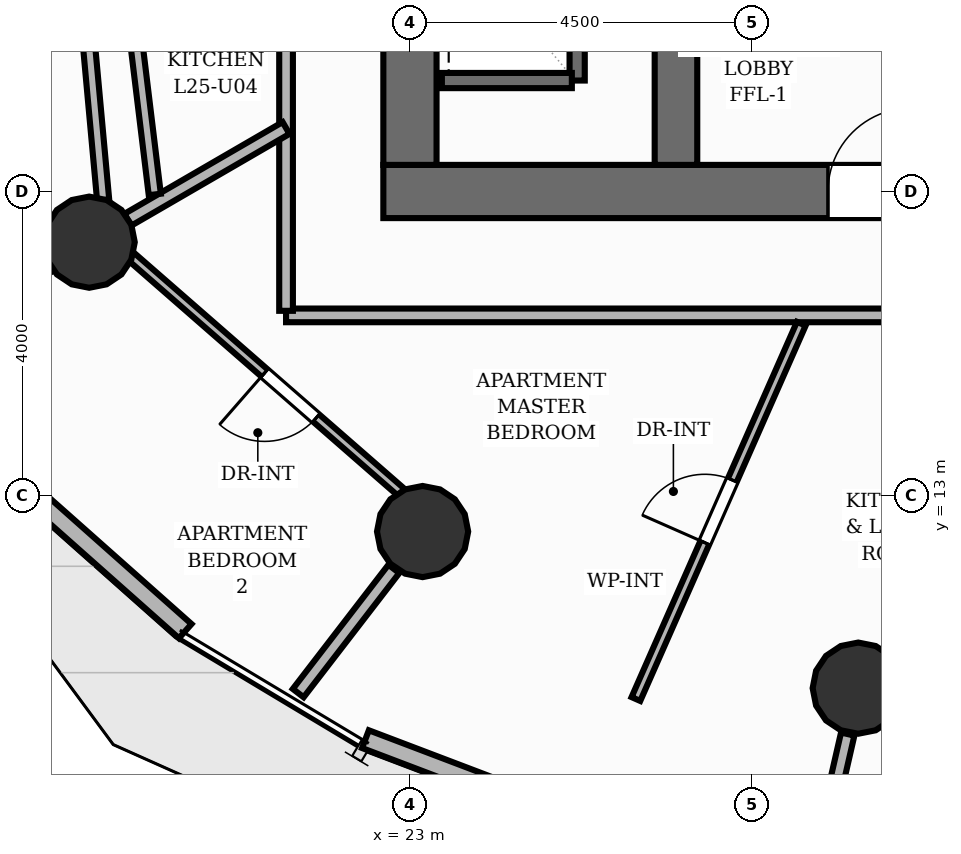
"""IFC4 building model, lengths in metres.
Left out: names, types, materials, properties, quantities, classifications, styles, units other than length and angle.
Written with IfcOpenShell. Run it as: python <this file> out.ifc"""

import sys

from ifc_helpers import new_model, si_unit, direction, frame, frame_2d, origin, origin_2d, place, context, subcontext, project, spatial, rectangle, circle, extrude, element, fill, save


model = new_model("IFC4")
c1 = context("Model", 3, precision=1e-05, world=origin(), true_north=direction((0.0, 1.0)))
c2 = subcontext(c1, "Body", "Model", "MODEL_VIEW")
j1 = project(units=[si_unit("LENGTHUNIT", "METRE"), si_unit("PLANEANGLEUNIT", "RADIAN")], contexts=[c1])
p1 = place(None, origin())
s1 = spatial("IfcSite", under=j1, at=p1, CompositionType="ELEMENT")
p2 = place(p1, origin())
s2 = spatial("IfcBuilding", under=s1, at=p2, CompositionType="ELEMENT")
p3 = place(p2, frame((0.0, 0.0, 86.88)))
s3 = spatial("IfcBuildingStorey", under=s2, at=p3, CompositionType="ELEMENT", Elevation=86.88)
p4 = place(p3, frame((22.65, 17.0, 0.0), z_axis=(0.0, 0.0, 1.0), x_axis=(1.0, 0.0, 0.0)))
e1 = element("IfcWall", 1, at=p4, inside=s3, PredefinedType="SHEAR", context=c2, shape_type="SweptSolid", body=[
    extrude(rectangle(XDim=18.7, YDim=0.7, at=frame_2d((9.35, 0.0))), origin(), (0.0, 0.0, 1.0), 3.2),
])
p5 = place(p4, frame((5.85, 0.0, 0.0)))
e2 = element("IfcOpeningElement", 2, at=p5, cuts=e1, PredefinedType="OPENING", context=c2, shape_type="SweptSolid", body=[
    extrude(rectangle(XDim=1.1, YDim=2.15, at=frame_2d((0.55, 1.075))), frame((0.0, 0.36, 0.0), z_axis=(0.0, -1.0, 0.0), x_axis=(1.0, 0.0, 0.0)), (0.0, 0.0, 1.0), 0.72),
])
p6 = place(p4, frame((9.4, 0.0, 0.0)))
e3 = element("IfcOpeningElement", 3, at=p6, cuts=e1, PredefinedType="OPENING", context=c2, shape_type="SweptSolid", body=[
    extrude(rectangle(XDim=0.9, YDim=2.1, at=frame_2d((0.45, 1.05))), frame((0.0, 0.36, 0.0), z_axis=(0.0, -1.0, 0.0), x_axis=(1.0, 0.0, 0.0)), (0.0, 0.0, 1.0), 0.72),
])
p7 = place(p3, frame((23.0, 17.35, 0.0), z_axis=(0.0, 0.0, 1.0), x_axis=(0.0, 1.0, 0.0)))
e4 = element("IfcWall", 4, at=p7, inside=s3, PredefinedType="SHEAR", context=c2, shape_type="SweptSolid", body=[
    extrude(rectangle(XDim=13.3, YDim=0.7, at=frame_2d((6.65, 0.0))), origin(), (0.0, 0.0, 1.0), 3.2),
])
p8 = place(p3, frame((26.5, 17.35, 0.0), z_axis=(0.0, 0.0, 1.0), x_axis=(0.0, 1.0, 0.0)))
e5 = element("IfcWall", 5, at=p8, inside=s3, PredefinedType="SHEAR", context=c2, shape_type="SweptSolid", body=[
    extrude(rectangle(XDim=13.3, YDim=0.56, at=frame_2d((6.65, 0.0))), origin(), (0.0, 0.0, 1.0), 3.2),
])
for number, where, z_axis, x_axis in (
    (6, (18.78, 16.333, 0.0), (0.0, 0.0, 1.0), (1.0, 0.0, 0.0)),
    (7, (23.167, 12.526, 0.0), (0.0, 0.0, 1.0), (1.0, 0.0, 0.0)),
    (8, (28.898, 10.465, 0.0), (0.0, 0.0, 1.0), (1.0, 0.0, 0.0)),
):
    element("IfcColumn", number, at=place(p3, frame(where, z_axis=z_axis, x_axis=x_axis)), inside=s3, PredefinedType="COLUMN", context=c2, shape_type="SweptSolid", body=[
        extrude(circle(Radius=0.6, at=origin_2d()), origin(), (0.0, 0.0, 1.0), 3.2),
    ])
p9 = place(p3, frame((20.043, 11.216, 0.0), z_axis=(0.0, 0.0, 1.0), x_axis=(-0.747828492436, 0.663891968547, 0.0)))
e9 = element("IfcWall", 9, at=p9, inside=s3, PredefinedType="SOLIDWALL", context=c2, shape_type="SweptSolid", body=[
    extrude(rectangle(XDim=2.923, YDim=0.25, at=frame_2d((1.461, 0.0))), origin(), (0.0, 0.0, 1.0), 2.96),
])
p10 = place(p3, frame((25.276, 8.707, 0.0), z_axis=(0.0, 0.0, 1.0), x_axis=(-0.934815891493, 0.355132720277, 0.0)))
e10 = element("IfcWall", 10, at=p10, inside=s3, PredefinedType="SOLIDWALL", context=c2, shape_type="SweptSolid", body=[
    extrude(rectangle(XDim=3.061, YDim=0.25, at=frame_2d((1.53, 0.0))), origin(), (0.0, 0.0, 1.0), 2.96),
])
p11 = place(p3, frame((25.2, 18.46, 0.0), z_axis=(0.0, 0.0, 1.0), x_axis=(0.0, 1.0, 0.0)))
e11 = element("IfcWall", 11, at=p11, inside=s3, PredefinedType="SHEAR", context=c2, shape_type="SweptSolid", body=[
    extrude(rectangle(XDim=11.08, YDim=0.2, at=frame_2d((5.54, 0.0))), origin(), (0.0, 0.0, 1.0), 3.2),
])
p12 = place(p3, frame((23.42, 18.46, 0.0), z_axis=(0.0, 0.0, 1.0), x_axis=(1.0, 0.0, 0.0)))
e12 = element("IfcWall", 12, at=p12, inside=s3, PredefinedType="SHEAR", context=c2, shape_type="SweptSolid", body=[
    extrude(rectangle(XDim=1.71, YDim=0.2, at=frame_2d((0.855, 0.0))), origin(), (0.0, 0.0, 1.0), 3.2),
])
p13 = place(p3, frame((18.243, 16.022, 0.0), z_axis=(0.0, 0.0, 1.0), x_axis=(-0.865046065875, -0.501692439563, 0.0)))
e13 = element("IfcWall", 13, at=p13, inside=s3, PredefinedType="PARTITIONING", context=c2, shape_type="SweptSolid", body=[
    extrude(rectangle(XDim=1.994, YDim=0.18, at=frame_2d((0.997, 0.0))), origin(), (0.0, 0.0, 1.0), 2.261),
])
p14 = place(p3, frame((22.788, 12.034, 0.0), z_axis=(0.0, 0.0, 1.0), x_axis=(-0.609991040385, -0.792408310564, 0.0)))
e14 = element("IfcWall", 14, at=p14, inside=s3, PredefinedType="PARTITIONING", context=c2, shape_type="SweptSolid", body=[
    extrude(rectangle(XDim=2.062, YDim=0.18, at=frame_2d((1.031, 0.0))), origin(), (0.0, 0.0, 1.0), 2.261),
])
p15 = place(p3, frame((28.76, 9.861, 0.0), z_axis=(0.0, 0.0, 1.0), x_axis=(-0.223359217097, -0.974736200281, 0.0)))
e15 = element("IfcWall", 15, at=p15, inside=s3, PredefinedType="PARTITIONING", context=c2, shape_type="SweptSolid", body=[
    extrude(rectangle(XDim=1.712, YDim=0.18, at=frame_2d((0.856, 0.0))), origin(), (0.0, 0.0, 1.0), 2.261),
])
p16 = place(p3, frame((41.695, 15.37, 0.0), z_axis=(0.0, 0.0, 1.0), x_axis=(-1.0, 0.0, 0.0)))
e16 = element("IfcWall", 16, at=p16, inside=s3, PredefinedType="PARTITIONING", context=c2, shape_type="SweptSolid", body=[
    extrude(rectangle(XDim=20.325, YDim=0.18, at=frame_2d((10.163, 0.0))), origin(), (0.0, 0.0, 1.0), 2.955),
])
p17 = place(p16, frame((11.424, 0.0, 0.0)))
e17 = element("IfcOpeningElement", 17, at=p17, cuts=e16, PredefinedType="OPENING", context=c2, shape_type="SweptSolid", body=[
    extrude(rectangle(XDim=1.05, YDim=2.15, at=frame_2d((0.525, 1.075))), frame((0.0, 0.1, 0.0), z_axis=(0.0, -1.0, 0.0), x_axis=(1.0, 0.0, 0.0)), (0.0, 0.0, 1.0), 0.2),
])
p18 = place(p3, frame((21.37, 15.43, 0.0), z_axis=(0.0, 0.0, 1.0), x_axis=(0.0, 1.0, 0.0)))
e18 = element("IfcWall", 18, at=p18, inside=s3, PredefinedType="PARTITIONING", context=c2, shape_type="SweptSolid", body=[
    extrude(rectangle(XDim=7.727, YDim=0.18, at=frame_2d((3.863, 0.0))), origin(), (0.0, 0.0, 1.0), 2.955),
])
p19 = place(p3, frame((25.973, 10.322, 0.0), z_axis=(0.0, 0.0, 1.0), x_axis=(0.403235845427, 0.91509608947, 0.0)))
e19 = element("IfcWall", 19, at=p19, inside=s3, PredefinedType="PARTITIONING", context=c2, shape_type="SweptSolid", body=[
    extrude(rectangle(XDim=5.396, YDim=0.125, at=frame_2d((2.698, 0.0))), origin(), (0.0, 0.0, 1.0), 2.955),
])
p20 = place(p19, frame((2.248, 0.0, 0.0)))
e20 = element("IfcOpeningElement", 20, at=p20, cuts=e19, PredefinedType="OPENING", context=c2, shape_type="SweptSolid", body=[
    extrude(rectangle(XDim=0.9, YDim=2.1, at=frame_2d((0.45, 1.05))), frame((0.0, 0.073, 0.0), z_axis=(0.0, -1.0, 0.0), x_axis=(1.0, 0.0, 0.0)), (0.0, 0.0, 1.0), 0.145),
])
p21 = place(p3, frame((22.888, 13.04, 0.0), z_axis=(0.0, 0.0, 1.0), x_axis=(-0.753425123405, 0.657533712765, 0.0)))
e21 = element("IfcWall", 21, at=p21, inside=s3, PredefinedType="PARTITIONING", context=c2, shape_type="SweptSolid", body=[
    extrude(rectangle(XDim=4.72, YDim=0.125, at=frame_2d((2.36, 0.0))), origin(), (0.0, 0.0, 1.0), 2.404),
])
p22 = place(p21, frame((1.49, 0.0, 0.0)))
e22 = element("IfcOpeningElement", 22, at=p22, cuts=e21, PredefinedType="OPENING", context=c2, shape_type="SweptSolid", body=[
    extrude(rectangle(XDim=0.9, YDim=2.1, at=frame_2d((0.45, 1.05))), frame((0.0, 0.073, 0.0), z_axis=(0.0, -1.0, 0.0), x_axis=(1.0, 0.0, 0.0)), (0.0, 0.0, 1.0), 0.145),
])
p23 = place(p3, frame((19.288, 16.628, 0.0), z_axis=(0.0, 0.0, 1.0), x_axis=(0.86502326608, 0.501731750182, 0.0)))
e23 = element("IfcWall", 23, at=p23, inside=s3, PredefinedType="PARTITIONING", context=c2, shape_type="SweptSolid", body=[
    extrude(rectangle(XDim=2.407, YDim=0.18, at=frame_2d((1.204, 0.0))), origin(), (0.0, 0.0, 1.0), 2.261),
])
p24 = place(p3, frame((18.964, 16.887, 0.0), z_axis=(0.0, 0.0, 1.0), x_axis=(-0.091023836021, 0.995848714051, 0.0)))
e24 = element("IfcWall", 24, at=p24, inside=s3, PredefinedType="PLUMBINGWALL", context=c2, shape_type="SweptSolid", body=[
    extrude(rectangle(XDim=3.157, YDim=0.16, at=frame_2d((1.579, 0.0))), origin(), (0.0, 0.0, 1.0), 2.955),
])
p25 = place(p3, frame((18.935, 22.782, 0.0), z_axis=(0.0, 0.0, 1.0), x_axis=(0.120703145243, -0.992688647426, 0.0)))
e25 = element("IfcWall", 25, at=p25, inside=s3, PredefinedType="PLUMBINGWALL", context=c2, shape_type="SweptSolid", body=[
    extrude(rectangle(XDim=5.864, YDim=0.16, at=frame_2d((2.932, 0.0))), origin(), (0.0, 0.0, 1.0), 2.955),
])
p26 = place(p25, frame((1.642, 0.0, 0.0)))
e26 = element("IfcOpeningElement", 26, at=p26, cuts=e25, PredefinedType="OPENING", context=c2, shape_type="SweptSolid", body=[
    extrude(rectangle(XDim=0.9, YDim=2.1, at=frame_2d((0.45, 1.05))), frame((0.0, 0.09, 0.0), z_axis=(0.0, -1.0, 0.0), x_axis=(1.0, 0.0, 0.0)), (0.0, 0.0, 1.0), 0.18),
])
p27 = place(p5, origin())
e27 = element("IfcDoor", 27, at=p27, inside=s3, OperationType="SINGLE_SWING_RIGHT", PredefinedType="DOOR", context=c2, shape_type="SweptSolid", body=[
    extrude(rectangle(XDim=1.1, YDim=2.15, at=frame_2d((0.55, 1.075))), frame((0.0, 0.025, 0.0), z_axis=(0.0, -1.0, 0.0), x_axis=(1.0, 0.0, 0.0)), (0.0, 0.0, 1.0), 0.05),
])
fill(e2, e27)
p28 = place(p20, origin())
e28 = element("IfcDoor", 28, at=p28, inside=s3, OperationType="SINGLE_SWING_LEFT", PredefinedType="DOOR", context=c2, shape_type="SweptSolid", body=[
    extrude(rectangle(XDim=0.9, YDim=2.1, at=frame_2d((0.45, 1.05))), frame((0.0, 0.025, 0.0), z_axis=(0.0, -1.0, 0.0), x_axis=(1.0, 0.0, 0.0)), (0.0, 0.0, 1.0), 0.05),
])
fill(e20, e28)
p29 = place(p22, origin())
e29 = element("IfcDoor", 29, at=p29, inside=s3, OperationType="SINGLE_SWING_RIGHT", PredefinedType="DOOR", context=c2, shape_type="SweptSolid", body=[
    extrude(rectangle(XDim=0.9, YDim=2.1, at=frame_2d((0.45, 1.05))), frame((0.0, 0.025, 0.0), z_axis=(0.0, -1.0, 0.0), x_axis=(1.0, 0.0, 0.0)), (0.0, 0.0, 1.0), 0.05),
])
fill(e22, e29)
save(model, sys.argv[1])
